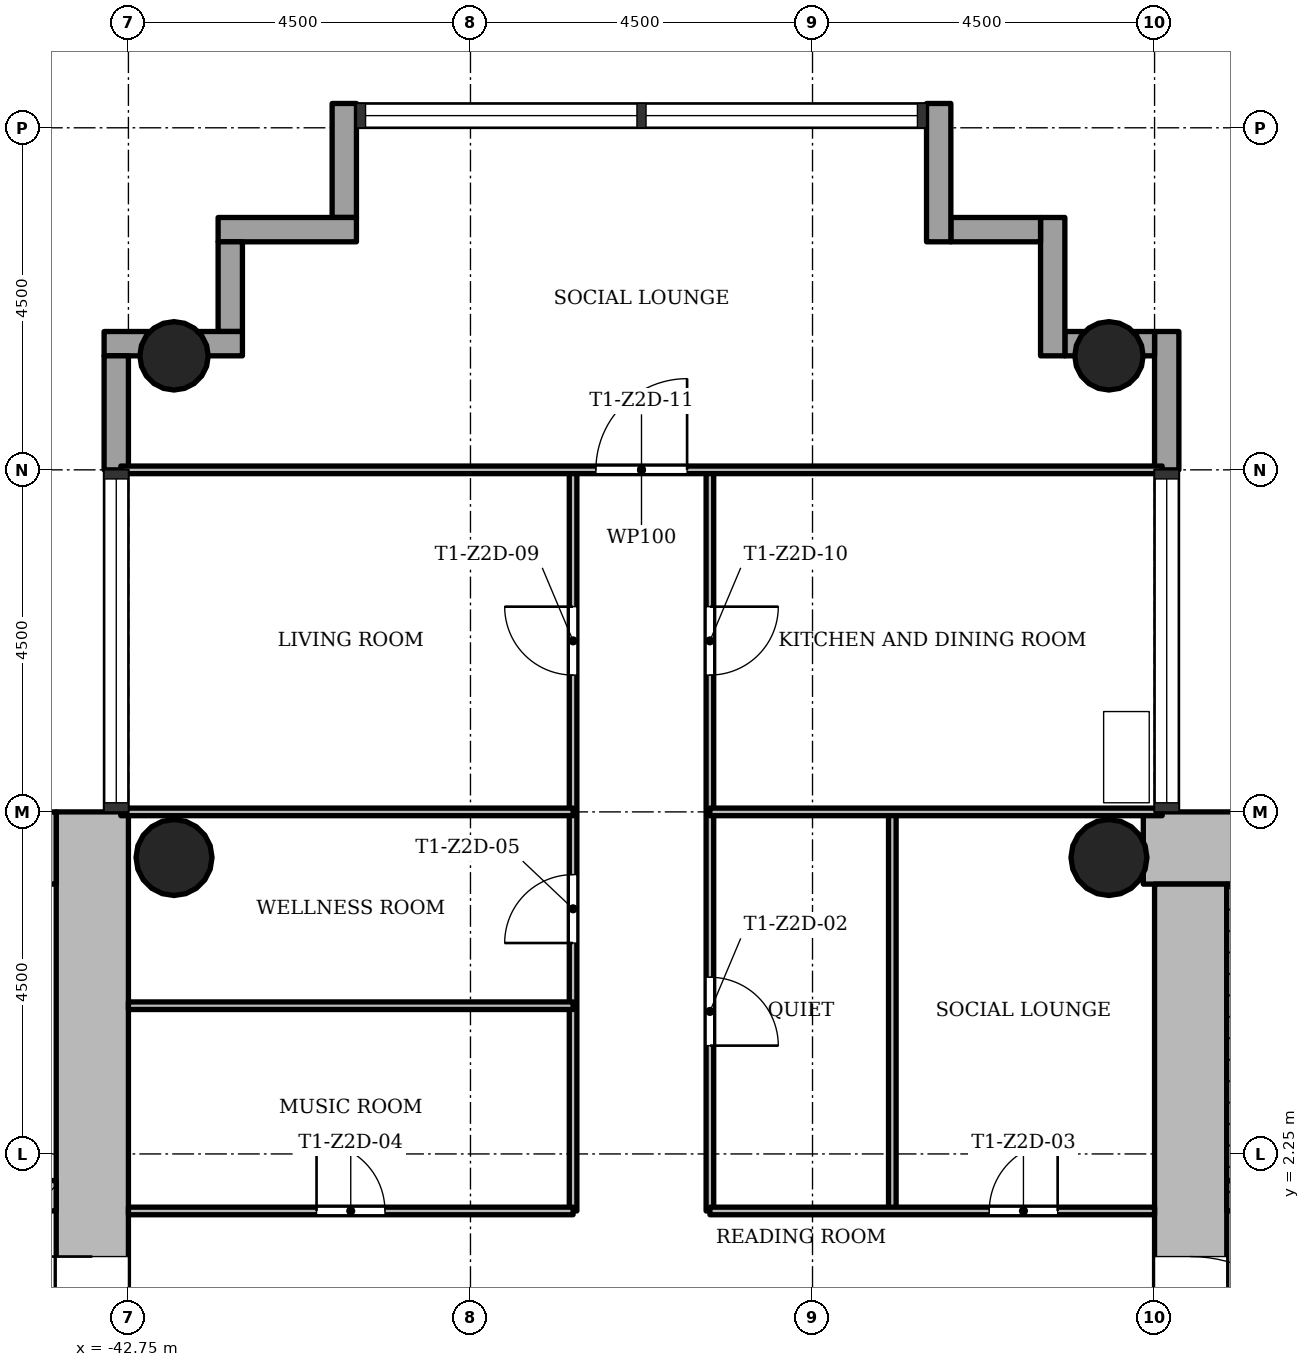
"""IFC4 building model, lengths in metres.
Left out: names, types, materials, properties, quantities, classifications, styles, units other than length and angle.
Written with IfcOpenShell. Run it as: python <this file> out.ifc"""

import sys

from ifc_helpers import new_model, si_unit, direction, frame, frame_2d, origin, origin_2d, place, context, subcontext, project, spatial, rectangle, hollow_circle, extrude, element, fill, save


model = new_model("IFC4")
c1 = context("Model", 3, precision=1e-05, world=origin(), true_north=direction((0.0, 1.0)))
c2 = subcontext(c1, "Body", "Model", "MODEL_VIEW")
j1 = project(units=[si_unit("LENGTHUNIT", "METRE"), si_unit("PLANEANGLEUNIT", "RADIAN")], contexts=[c1])
p1 = place(None, origin())
s1 = spatial("IfcSite", under=j1, at=p1, CompositionType="ELEMENT")
p2 = place(p1, origin())
s2 = spatial("IfcBuilding", under=s1, at=p2, CompositionType="ELEMENT")
p3 = place(p2, frame((0.0, 0.0, 120.8)))
s3 = spatial("IfcBuildingStorey", under=s2, at=p3, CompositionType="ELEMENT", Elevation=120.8)
p4 = place(p3, frame((-20.702, 6.275, 0.0), z_axis=(0.0, 0.0, 1.0), x_axis=(-1.0, 0.0, 0.0)))
e1 = element("IfcWall", 1, at=p4, inside=s3, PredefinedType="SHEAR", context=c2, shape_type="SweptSolid", body=[
    extrude(rectangle(XDim=8.696, YDim=0.95, at=frame_2d((4.348, 0.0))), origin(), (0.0, 0.0, 1.0), 3.4),
])
p5 = place(p3, frame((-28.775, 5.8, 0.0), z_axis=(0.0, 0.0, 1.0), x_axis=(0.0, -1.0, 0.0)))
e2 = element("IfcWall", 2, at=p5, inside=s3, PredefinedType="SHEAR", context=c2, shape_type="SweptSolid", body=[
    extrude(rectangle(XDim=12.55, YDim=0.95, at=frame_2d((6.275, 0.0))), origin(), (0.0, 0.0, 1.0), 3.4),
])
p6 = place(p5, frame((4.9, 0.0, 0.0)))
e3 = element("IfcOpeningElement", 3, at=p6, cuts=e2, PredefinedType="OPENING", context=c2, shape_type="SweptSolid", body=[
    extrude(rectangle(XDim=1.8, YDim=2.1, at=frame_2d((0.9, 1.05))), frame((0.0, 0.485, 0.0), z_axis=(0.0, -1.0, 0.0), x_axis=(1.0, 0.0, 0.0)), (0.0, 0.0, 1.0), 0.97),
])
p7 = place(p3, frame((-28.3, 1.7, 0.0), z_axis=(0.0, 0.0, 1.0), x_axis=(1.0, 0.0, 0.0)))
e4 = element("IfcWall", 4, at=p7, inside=s3, PredefinedType="SHEAR", context=c2, shape_type="SweptSolid", body=[
    extrude(rectangle(XDim=7.1, YDim=0.4, at=frame_2d((3.55, 0.0))), origin(), (0.0, 0.0, 1.0), 3.4),
])
p8 = place(p7, frame((0.7, 0.0, 0.0)))
e5 = element("IfcOpeningElement", 5, at=p8, cuts=e4, PredefinedType="OPENING", context=c2, shape_type="SweptSolid", body=[
    extrude(rectangle(XDim=0.9, YDim=2.1, at=frame_2d((0.45, 1.05))), frame((0.0, 0.21, 0.0), z_axis=(0.0, -1.0, 0.0), x_axis=(1.0, 0.0, 0.0)), (0.0, 0.0, 1.0), 0.42),
])
p9 = place(p3, frame((-43.225, -5.8, 0.0), z_axis=(0.0, 0.0, 1.0), x_axis=(0.0, 1.0, 0.0)))
e6 = element("IfcWall", 6, at=p9, inside=s3, PredefinedType="SHEAR", context=c2, shape_type="SweptSolid", body=[
    extrude(rectangle(XDim=12.55, YDim=0.95, at=frame_2d((6.275, 0.0))), origin(), (0.0, 0.0, 1.0), 3.4),
])
p10 = place(p9, frame((4.9, 0.0, 0.0)))
e7 = element("IfcOpeningElement", 7, at=p10, cuts=e6, PredefinedType="OPENING", context=c2, shape_type="SweptSolid", body=[
    extrude(rectangle(XDim=1.8, YDim=2.1, at=frame_2d((0.9, 1.05))), frame((0.0, 0.485, 0.0), z_axis=(0.0, -1.0, 0.0), x_axis=(1.0, 0.0, 0.0)), (0.0, 0.0, 1.0), 0.97),
])
p11 = place(p3, frame((-43.7, 6.275, 0.0), z_axis=(0.0, 0.0, 1.0), x_axis=(-1.0, 0.0, 0.0)))
e8 = element("IfcWall", 8, at=p11, inside=s3, PredefinedType="SHEAR", context=c2, shape_type="SweptSolid", body=[
    extrude(rectangle(XDim=8.05, YDim=0.95, at=frame_2d((4.025, 0.0))), origin(), (0.0, 0.0, 1.0), 3.4),
])
p12 = place(p3, frame((-50.8, 1.7, 0.0), z_axis=(0.0, 0.0, 1.0), x_axis=(1.0, 0.0, 0.0)))
e9 = element("IfcWall", 9, at=p12, inside=s3, PredefinedType="SHEAR", context=c2, shape_type="SweptSolid", body=[
    extrude(rectangle(XDim=7.1, YDim=0.4, at=frame_2d((3.55, 0.0))), origin(), (0.0, 0.0, 1.0), 3.4),
])
p13 = place(p12, frame((5.2, 0.0, 0.0)))
e10 = element("IfcOpeningElement", 10, at=p13, cuts=e9, PredefinedType="OPENING", context=c2, shape_type="SweptSolid", body=[
    extrude(rectangle(XDim=1.1, YDim=2.1, at=frame_2d((0.55, 1.05))), frame((0.0, 0.21, 0.0), z_axis=(0.0, -1.0, 0.0), x_axis=(1.0, 0.0, 0.0)), (0.0, 0.0, 1.0), 0.42),
])
for number, where, z_axis, x_axis in (
    (11, (-29.85, 12.75, 0.0), (0.0, 0.0, 1.0), (1.0, 0.0, 0.0)),
    (12, (-42.15, 12.75, 0.0), (0.0, 0.0, 1.0), (1.0, 0.0, 0.0)),
):
    element("IfcColumn", number, at=place(p3, frame(where, z_axis=z_axis, x_axis=x_axis)), inside=s3, PredefinedType="COLUMN", context=c2, shape_type="SweptSolid", body=[
        extrude(hollow_circle(Radius=0.45, WallThickness=0.032, at=origin_2d()), origin(), (0.0, 0.0, 1.0), 3.4),
    ])
for number, where, z_axis, x_axis in (
    (13, (-29.85, 6.15, 0.0), (0.0, 0.0, 1.0), (1.0, 0.0, 0.0)),
    (14, (-42.15, 6.15, 0.0), (0.0, 0.0, 1.0), (1.0, 0.0, 0.0)),
):
    element("IfcColumn", number, at=place(p3, frame(where, z_axis=z_axis, x_axis=x_axis)), inside=s3, PredefinedType="COLUMN", context=c2, shape_type="SweptSolid", body=[
        extrude(hollow_circle(Radius=0.5, WallThickness=0.036, at=origin_2d()), origin(), (0.0, 0.0, 1.0), 3.4),
    ])
p14 = place(p3, frame((-29.09, 11.25, -0.3), z_axis=(0.0, 0.0, 1.0), x_axis=(0.0, 1.0, 0.0)))
e15 = element("IfcWall", 15, at=p14, inside=s3, PredefinedType="STANDARD", context=c2, shape_type="SweptSolid", body=[
    extrude(rectangle(XDim=1.82, YDim=0.32, at=frame_2d((0.91, 0.0))), origin(), (0.0, 0.0, 1.0), 3.4),
])
p15 = place(p3, frame((-29.25, 12.91, -0.3), z_axis=(0.0, 0.0, 1.0), x_axis=(-1.0, 0.0, 0.0)))
e16 = element("IfcWall", 16, at=p15, inside=s3, PredefinedType="STANDARD", context=c2, shape_type="SweptSolid", body=[
    extrude(rectangle(XDim=1.18, YDim=0.32, at=frame_2d((0.59, 0.0))), origin(), (0.0, 0.0, 1.0), 3.4),
])
p16 = place(p3, frame((-30.59, 12.75, -0.3), z_axis=(0.0, 0.0, 1.0), x_axis=(0.0, 1.0, 0.0)))
e17 = element("IfcWall", 17, at=p16, inside=s3, PredefinedType="STANDARD", context=c2, shape_type="SweptSolid", body=[
    extrude(rectangle(XDim=1.82, YDim=0.32, at=frame_2d((0.91, 0.0))), origin(), (0.0, 0.0, 1.0), 3.4),
])
p17 = place(p3, frame((-30.75, 14.41, -0.3), z_axis=(0.0, 0.0, 1.0), x_axis=(-1.0, 0.0, 0.0)))
e18 = element("IfcWall", 18, at=p17, inside=s3, PredefinedType="STANDARD", context=c2, shape_type="SweptSolid", body=[
    extrude(rectangle(XDim=1.18, YDim=0.32, at=frame_2d((0.59, 0.0))), origin(), (0.0, 0.0, 1.0), 3.4),
])
p18 = place(p3, frame((-32.09, 14.25, -0.3), z_axis=(0.0, 0.0, 1.0), x_axis=(0.0, 1.0, 0.0)))
e19 = element("IfcWall", 19, at=p18, inside=s3, PredefinedType="STANDARD", context=c2, shape_type="SweptSolid", body=[
    extrude(rectangle(XDim=1.82, YDim=0.32, at=frame_2d((0.91, 0.0))), origin(), (0.0, 0.0, 1.0), 3.4),
])
p19 = place(p3, frame((-39.91, 16.07, -0.3), z_axis=(0.0, 0.0, 1.0), x_axis=(0.0, -1.0, 0.0)))
e20 = element("IfcWall", 20, at=p19, inside=s3, PredefinedType="STANDARD", context=c2, shape_type="SweptSolid", body=[
    extrude(rectangle(XDim=1.5, YDim=0.32, at=frame_2d((0.75, 0.0))), origin(), (0.0, 0.0, 1.0), 3.4),
])
p20 = place(p3, frame((-39.75, 14.41, -0.3), z_axis=(0.0, 0.0, 1.0), x_axis=(-1.0, 0.0, 0.0)))
e21 = element("IfcWall", 21, at=p20, inside=s3, PredefinedType="STANDARD", context=c2, shape_type="SweptSolid", body=[
    extrude(rectangle(XDim=1.82, YDim=0.32, at=frame_2d((0.91, 0.0))), origin(), (0.0, 0.0, 1.0), 3.4),
])
p21 = place(p3, frame((-41.41, 14.25, -0.3), z_axis=(0.0, 0.0, 1.0), x_axis=(0.0, -1.0, 0.0)))
e22 = element("IfcWall", 22, at=p21, inside=s3, PredefinedType="STANDARD", context=c2, shape_type="SweptSolid", body=[
    extrude(rectangle(XDim=1.18, YDim=0.32, at=frame_2d((0.59, 0.0))), origin(), (0.0, 0.0, 1.0), 3.4),
])
p22 = place(p3, frame((-41.25, 12.91, -0.3), z_axis=(0.0, 0.0, 1.0), x_axis=(-1.0, 0.0, 0.0)))
e23 = element("IfcWall", 23, at=p22, inside=s3, PredefinedType="STANDARD", context=c2, shape_type="SweptSolid", body=[
    extrude(rectangle(XDim=1.82, YDim=0.32, at=frame_2d((0.91, 0.0))), origin(), (0.0, 0.0, 1.0), 3.4),
])
p23 = place(p3, frame((-42.91, 12.75, -0.3), z_axis=(0.0, 0.0, 1.0), x_axis=(0.0, -1.0, 0.0)))
e24 = element("IfcWall", 24, at=p23, inside=s3, PredefinedType="STANDARD", context=c2, shape_type="SweptSolid", body=[
    extrude(rectangle(XDim=1.5, YDim=0.32, at=frame_2d((0.75, 0.0))), origin(), (0.0, 0.0, 1.0), 3.4),
])
p24 = place(p3, frame((-36.9, 1.5, 0.0), z_axis=(0.0, 0.0, 1.0), x_axis=(0.0, 1.0, 0.0)))
e25 = element("IfcWall", 25, at=p24, inside=s3, PredefinedType="PARTITIONING", context=c2, shape_type="SweptSolid", body=[
    extrude(rectangle(XDim=9.75, YDim=0.1, at=frame_2d((4.875, 0.0))), origin(), (0.0, 0.0, 1.0), 3.0),
])
p25 = place(p24, frame((3.525, 0.0, 0.0)))
e26 = element("IfcOpeningElement", 26, at=p25, cuts=e25, PredefinedType="OPENING", context=c2, shape_type="SweptSolid", body=[
    extrude(rectangle(XDim=0.9, YDim=2.1, at=frame_2d((0.45, 1.05))), frame((0.0, 0.06, 0.0), z_axis=(0.0, -1.0, 0.0), x_axis=(1.0, 0.0, 0.0)), (0.0, 0.0, 1.0), 0.12),
])
p26 = place(p24, frame((7.05, 0.0, 0.0)))
e27 = element("IfcOpeningElement", 27, at=p26, cuts=e25, PredefinedType="OPENING", context=c2, shape_type="SweptSolid", body=[
    extrude(rectangle(XDim=0.9, YDim=2.1, at=frame_2d((0.45, 1.05))), frame((0.0, 0.06, 0.0), z_axis=(0.0, -1.0, 0.0), x_axis=(1.0, 0.0, 0.0)), (0.0, 0.0, 1.0), 0.12),
])
p27 = place(p3, frame((-35.1, 1.5, 0.0), z_axis=(0.0, 0.0, 1.0), x_axis=(0.0, 1.0, 0.0)))
e28 = element("IfcWall", 28, at=p27, inside=s3, PredefinedType="PARTITIONING", context=c2, shape_type="SweptSolid", body=[
    extrude(rectangle(XDim=9.75, YDim=0.1, at=frame_2d((4.875, 0.0))), origin(), (0.0, 0.0, 1.0), 3.0),
])
p28 = place(p27, frame((2.175, 0.0, 0.0)))
e29 = element("IfcOpeningElement", 29, at=p28, cuts=e28, PredefinedType="OPENING", context=c2, shape_type="SweptSolid", body=[
    extrude(rectangle(XDim=0.9, YDim=2.1, at=frame_2d((0.45, 1.05))), frame((0.0, 0.06, 0.0), z_axis=(0.0, -1.0, 0.0), x_axis=(1.0, 0.0, 0.0)), (0.0, 0.0, 1.0), 0.12),
])
p29 = place(p27, frame((7.05, 0.0, 0.0)))
e30 = element("IfcOpeningElement", 30, at=p29, cuts=e28, PredefinedType="OPENING", context=c2, shape_type="SweptSolid", body=[
    extrude(rectangle(XDim=0.9, YDim=2.1, at=frame_2d((0.45, 1.05))), frame((0.0, 0.06, 0.0), z_axis=(0.0, -1.0, 0.0), x_axis=(1.0, 0.0, 0.0)), (0.0, 0.0, 1.0), 0.12),
])
p30 = place(p3, frame((-32.7, 1.5, 0.0), z_axis=(0.0, 0.0, 1.0), x_axis=(0.0, 1.0, 0.0)))
e31 = element("IfcWall", 31, at=p30, inside=s3, PredefinedType="PARTITIONING", context=c2, shape_type="SweptSolid", body=[
    extrude(rectangle(XDim=5.25, YDim=0.1, at=frame_2d((2.625, 0.0))), origin(), (0.0, 0.0, 1.0), 3.0),
])
p31 = place(p3, frame((-42.75, 1.5, 0.0), z_axis=(0.0, 0.0, 1.0), x_axis=(1.0, 0.0, 0.0)))
e32 = element("IfcWall", 32, at=p31, inside=s3, PredefinedType="PARTITIONING", context=c2, shape_type="SweptSolid", body=[
    extrude(rectangle(XDim=5.85, YDim=0.1, at=frame_2d((2.925, 0.0))), origin(), (0.0, 0.0, 1.0), 3.0),
])
p32 = place(p31, frame((2.475, 0.0, 0.0)))
e33 = element("IfcOpeningElement", 33, at=p32, cuts=e32, PredefinedType="OPENING", context=c2, shape_type="SweptSolid", body=[
    extrude(rectangle(XDim=0.9, YDim=2.1, at=frame_2d((0.45, 1.05))), frame((0.0, 0.06, 0.0), z_axis=(0.0, -1.0, 0.0), x_axis=(1.0, 0.0, 0.0)), (0.0, 0.0, 1.0), 0.12),
])
p33 = place(p3, frame((-35.1, 1.5, 0.0), z_axis=(0.0, 0.0, 1.0), x_axis=(1.0, 0.0, 0.0)))
e34 = element("IfcWall", 34, at=p33, inside=s3, PredefinedType="PARTITIONING", context=c2, shape_type="SweptSolid", body=[
    extrude(rectangle(XDim=5.85, YDim=0.1, at=frame_2d((2.925, 0.0))), origin(), (0.0, 0.0, 1.0), 3.0),
])
p34 = place(p33, frame((3.675, 0.0, 0.0)))
e35 = element("IfcOpeningElement", 35, at=p34, cuts=e34, PredefinedType="OPENING", context=c2, shape_type="SweptSolid", body=[
    extrude(rectangle(XDim=0.9, YDim=2.1, at=frame_2d((0.45, 1.05))), frame((0.0, 0.06, 0.0), z_axis=(0.0, -1.0, 0.0), x_axis=(1.0, 0.0, 0.0)), (0.0, 0.0, 1.0), 0.12),
])
p35 = place(p3, frame((-42.75, 4.2, 0.0), z_axis=(0.0, 0.0, 1.0), x_axis=(1.0, 0.0, 0.0)))
e36 = element("IfcWall", 36, at=p35, inside=s3, PredefinedType="PARTITIONING", context=c2, shape_type="SweptSolid", body=[
    extrude(rectangle(XDim=5.85, YDim=0.1, at=frame_2d((2.925, 0.0))), origin(), (0.0, 0.0, 1.0), 3.0),
])
for number, where, z_axis, x_axis in (
    (37, (-42.85, 6.75, 0.0), (0.0, 0.0, 1.0), (1.0, 0.0, 0.0)),
    (38, (-35.1, 6.75, 0.0), (0.0, 0.0, 1.0), (1.0, 0.0, 0.0)),
):
    element("IfcWall", number, at=place(p3, frame(where, z_axis=z_axis, x_axis=x_axis)), inside=s3, PredefinedType="PARTITIONING", context=c2, shape_type="SweptSolid", body=[
        extrude(rectangle(XDim=5.95, YDim=0.1, at=frame_2d((2.975, 0.0))), origin(), (0.0, 0.0, 1.0), 3.0),
    ])
p36 = place(p3, frame((-42.85, 11.25, 0.0), z_axis=(0.0, 0.0, 1.0), x_axis=(1.0, 0.0, 0.0)))
e39 = element("IfcWall", 39, at=p36, inside=s3, PredefinedType="PARTITIONING", context=c2, shape_type="SweptSolid", body=[
    extrude(rectangle(XDim=13.7, YDim=0.1, at=frame_2d((6.85, 0.0))), origin(), (0.0, 0.0, 1.0), 3.0),
])
p37 = place(p36, frame((6.25, 0.0, 0.0)))
e40 = element("IfcOpeningElement", 40, at=p37, cuts=e39, PredefinedType="OPENING", context=c2, shape_type="SweptSolid", body=[
    extrude(rectangle(XDim=1.2, YDim=2.1, at=frame_2d((0.6, 1.05))), frame((0.0, 0.06, 0.0), z_axis=(0.0, -1.0, 0.0), x_axis=(1.0, 0.0, 0.0)), (0.0, 0.0, 1.0), 0.12),
])
p38 = place(p3, frame((-28.175, 1.9, 0.0), z_axis=(0.0, 0.0, 1.0), x_axis=(0.0, 1.0, 0.0)))
e41 = element("IfcWall", 41, at=p38, inside=s3, PredefinedType="SHEAR", context=c2, shape_type="SweptSolid", body=[
    extrude(rectangle(XDim=3.9, YDim=0.25, at=frame_2d((1.95, 0.0))), origin(), (0.0, 0.0, 1.0), 3.4),
])
p39 = place(p28, origin())
e42 = element("IfcDoor", 42, at=p39, inside=s3, OperationType="SINGLE_SWING_LEFT", PredefinedType="DOOR", context=c2, shape_type="SweptSolid", body=[
    extrude(rectangle(XDim=0.9, YDim=2.1, at=frame_2d((0.45, 1.05))), frame((0.0, 0.025, 0.0), z_axis=(0.0, -1.0, 0.0), x_axis=(1.0, 0.0, 0.0)), (0.0, 0.0, 1.0), 0.05),
])
fill(e29, e42)
p40 = place(p34, origin())
e43 = element("IfcDoor", 43, at=p40, inside=s3, OperationType="SINGLE_SWING_LEFT", PredefinedType="DOOR", context=c2, shape_type="SweptSolid", body=[
    extrude(rectangle(XDim=0.9, YDim=2.1, at=frame_2d((0.45, 1.05))), frame((0.0, 0.025, 0.0), z_axis=(0.0, -1.0, 0.0), x_axis=(1.0, 0.0, 0.0)), (0.0, 0.0, 1.0), 0.05),
])
fill(e35, e43)
p41 = place(p32, origin())
e44 = element("IfcDoor", 44, at=p41, inside=s3, OperationType="SINGLE_SWING_RIGHT", PredefinedType="DOOR", context=c2, shape_type="SweptSolid", body=[
    extrude(rectangle(XDim=0.9, YDim=2.1, at=frame_2d((0.45, 1.05))), frame((0.0, 0.025, 0.0), z_axis=(0.0, -1.0, 0.0), x_axis=(1.0, 0.0, 0.0)), (0.0, 0.0, 1.0), 0.05),
])
fill(e33, e44)
p42 = place(p25, origin())
e45 = element("IfcDoor", 45, at=p42, inside=s3, OperationType="SINGLE_SWING_RIGHT", PredefinedType="DOOR", context=c2, shape_type="SweptSolid", body=[
    extrude(rectangle(XDim=0.9, YDim=2.1, at=frame_2d((0.45, 1.05))), frame((0.0, 0.025, 0.0), z_axis=(0.0, -1.0, 0.0), x_axis=(1.0, 0.0, 0.0)), (0.0, 0.0, 1.0), 0.05),
])
fill(e26, e45)
p43 = place(p26, origin())
e46 = element("IfcDoor", 46, at=p43, inside=s3, OperationType="SINGLE_SWING_LEFT", PredefinedType="DOOR", context=c2, shape_type="SweptSolid", body=[
    extrude(rectangle(XDim=0.9, YDim=2.1, at=frame_2d((0.45, 1.05))), frame((0.0, 0.025, 0.0), z_axis=(0.0, -1.0, 0.0), x_axis=(1.0, 0.0, 0.0)), (0.0, 0.0, 1.0), 0.05),
])
fill(e27, e46)
p44 = place(p29, origin())
e47 = element("IfcDoor", 47, at=p44, inside=s3, OperationType="SINGLE_SWING_RIGHT", PredefinedType="DOOR", context=c2, shape_type="SweptSolid", body=[
    extrude(rectangle(XDim=0.9, YDim=2.1, at=frame_2d((0.45, 1.05))), frame((0.0, 0.025, 0.0), z_axis=(0.0, -1.0, 0.0), x_axis=(1.0, 0.0, 0.0)), (0.0, 0.0, 1.0), 0.05),
])
fill(e30, e47)
p45 = place(p37, origin())
e48 = element("IfcDoor", 48, at=p45, inside=s3, OperationType="SINGLE_SWING_LEFT", PredefinedType="DOOR", context=c2, shape_type="SweptSolid", body=[
    extrude(rectangle(XDim=1.2, YDim=2.1, at=frame_2d((0.6, 1.05))), frame((0.0, 0.025, 0.0), z_axis=(0.0, -1.0, 0.0), x_axis=(1.0, 0.0, 0.0)), (0.0, 0.0, 1.0), 0.05),
])
fill(e40, e48)
p46 = place(p6, origin())
e49 = element("IfcDoor", 49, at=p46, inside=s3, OperationType="SINGLE_SWING_LEFT", PredefinedType="DOOR", context=c2, shape_type="SweptSolid", body=[
    extrude(rectangle(XDim=1.8, YDim=2.1, at=frame_2d((0.9, 1.05))), frame((0.0, 0.025, 0.0), z_axis=(0.0, -1.0, 0.0), x_axis=(1.0, 0.0, 0.0)), (0.0, 0.0, 1.0), 0.05),
])
fill(e3, e49)
p47 = place(p10, origin())
e50 = element("IfcDoor", 50, at=p47, inside=s3, OperationType="SINGLE_SWING_LEFT", PredefinedType="DOOR", context=c2, shape_type="SweptSolid", body=[
    extrude(rectangle(XDim=1.8, YDim=2.1, at=frame_2d((0.9, 1.05))), frame((0.0, 0.025, 0.0), z_axis=(0.0, -1.0, 0.0), x_axis=(1.0, 0.0, 0.0)), (0.0, 0.0, 1.0), 0.05),
])
fill(e7, e50)
save(model, sys.argv[1])
